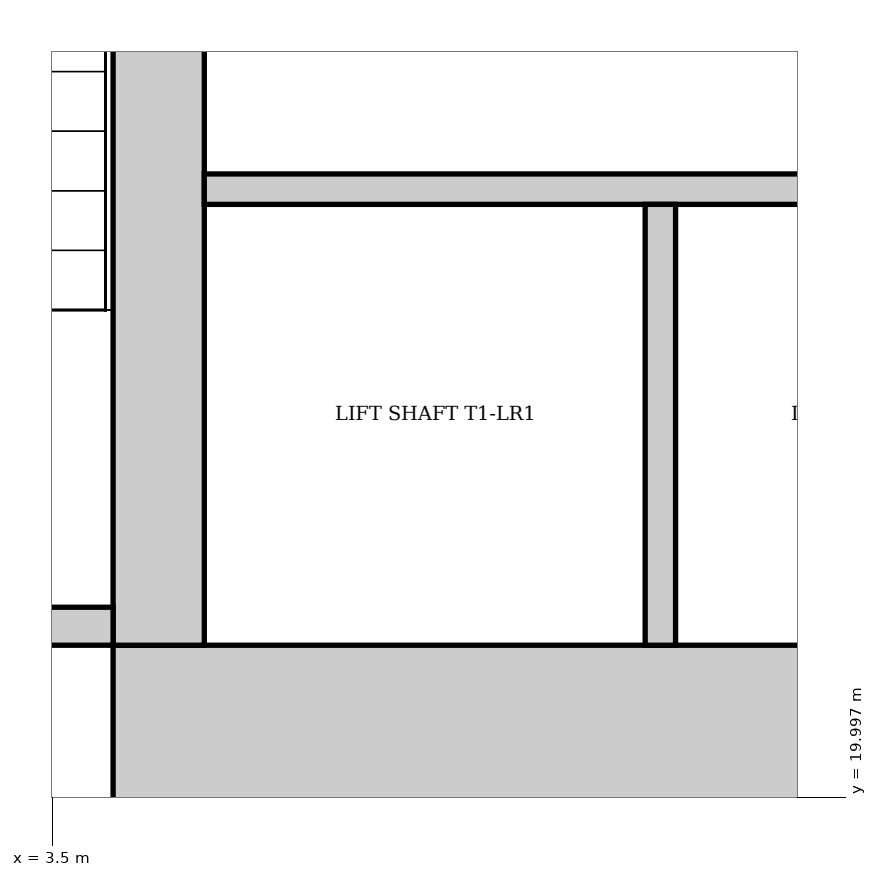
"""IFC4 building model, lengths in metres.
Left out: names, types, materials, properties, quantities, classifications, styles, units other than length and angle.
Written with IfcOpenShell. Run it as: python <this file> out.ifc"""

import sys

from ifc_helpers import new_model, si_unit, direction, frame, frame_2d, origin, place, context, subcontext, project, spatial, rectangle, extrude, element, save


model = new_model("IFC4")
c1 = context("Model", 3, precision=1e-05, world=origin(), true_north=direction((0.0, 1.0)))
c2 = subcontext(c1, "Body", "Model", "MODEL_VIEW")
j1 = project(units=[si_unit("LENGTHUNIT", "METRE"), si_unit("PLANEANGLEUNIT", "RADIAN")], contexts=[c1])
p1 = place(None, origin())
s1 = spatial("IfcSite", under=j1, at=p1, CompositionType="ELEMENT")
p2 = place(p1, origin())
s2 = spatial("IfcBuilding", under=s1, at=p2, CompositionType="ELEMENT")
p3 = place(p2, frame((0.0, 0.0, -5.0)))
s3 = spatial("IfcBuildingStorey", under=s2, at=p3, CompositionType="ELEMENT", Elevation=-5.0)
p4 = place(p3, frame((3.9, 20.4, 0.0), z_axis=(0.0, 0.0, 1.0), x_axis=(1.0, 0.0, 0.0)))
e1 = element("IfcWall", 1, at=p4, inside=s3, PredefinedType="SOLIDWALL", context=c2, shape_type="SweptSolid", body=[
    extrude(rectangle(XDim=19.8, YDim=1.2, at=frame_2d((9.9, 0.0))), origin(), (0.0, 0.0, 1.0), 5.0),
])
p5 = place(p3, frame((4.2, 31.5, 0.0), z_axis=(0.0, 0.0, 1.0), x_axis=(0.0, -1.0, 0.0)))
e2 = element("IfcWall", 2, at=p5, inside=s3, PredefinedType="SOLIDWALL", context=c2, shape_type="SweptSolid", body=[
    extrude(rectangle(XDim=10.5, YDim=0.6, at=frame_2d((5.25, 0.0))), origin(), (0.0, 0.0, 1.0), 5.0),
])
p6 = place(p5, frame((4.25, 0.0, 0.0)))
e3 = element("IfcOpeningElement", 3, at=p6, cuts=e2, PredefinedType="OPENING", context=c2, shape_type="SweptSolid", body=[
    extrude(rectangle(XDim=1.0, YDim=2.1, at=frame_2d((0.5, 1.05))), frame((0.0, 0.31, 0.0), z_axis=(0.0, -1.0, 0.0), x_axis=(1.0, 0.0, 0.0)), (0.0, 0.0, 1.0), 0.62),
])
p7 = place(p3, frame((0.36, 21.125, 0.0), z_axis=(0.0, 0.0, 1.0), x_axis=(1.0, 0.0, 0.0)))
e4 = element("IfcWall", 4, at=p7, inside=s3, PredefinedType="SOLIDWALL", context=c2, shape_type="SweptSolid", body=[
    extrude(rectangle(XDim=3.54, YDim=0.25, at=frame_2d((1.77, 0.0))), origin(), (0.0, 0.0, 1.0), 5.0),
])
p8 = place(p3, frame((4.5, 24.0, 0.0), z_axis=(0.0, 0.0, 1.0), x_axis=(1.0, 0.0, 0.0)))
e5 = element("IfcWall", 5, at=p8, inside=s3, PredefinedType="PARTITIONING", context=c2, shape_type="SweptSolid", body=[
    extrude(rectangle(XDim=18.0, YDim=0.2, at=frame_2d((9.0, 0.0))), origin(), (0.0, 0.0, 1.0), 4.7),
])
p9 = place(p3, frame((7.5, 21.0, 0.0), z_axis=(0.0, 0.0, 1.0), x_axis=(0.0, 1.0, 0.0)))
e6 = element("IfcWall", 6, at=p9, inside=s3, PredefinedType="PARTITIONING", context=c2, shape_type="SweptSolid", body=[
    extrude(rectangle(XDim=2.9, YDim=0.2, at=frame_2d((1.45, 0.0))), origin(), (0.0, 0.0, 1.0), 4.7),
])
save(model, sys.argv[1])
